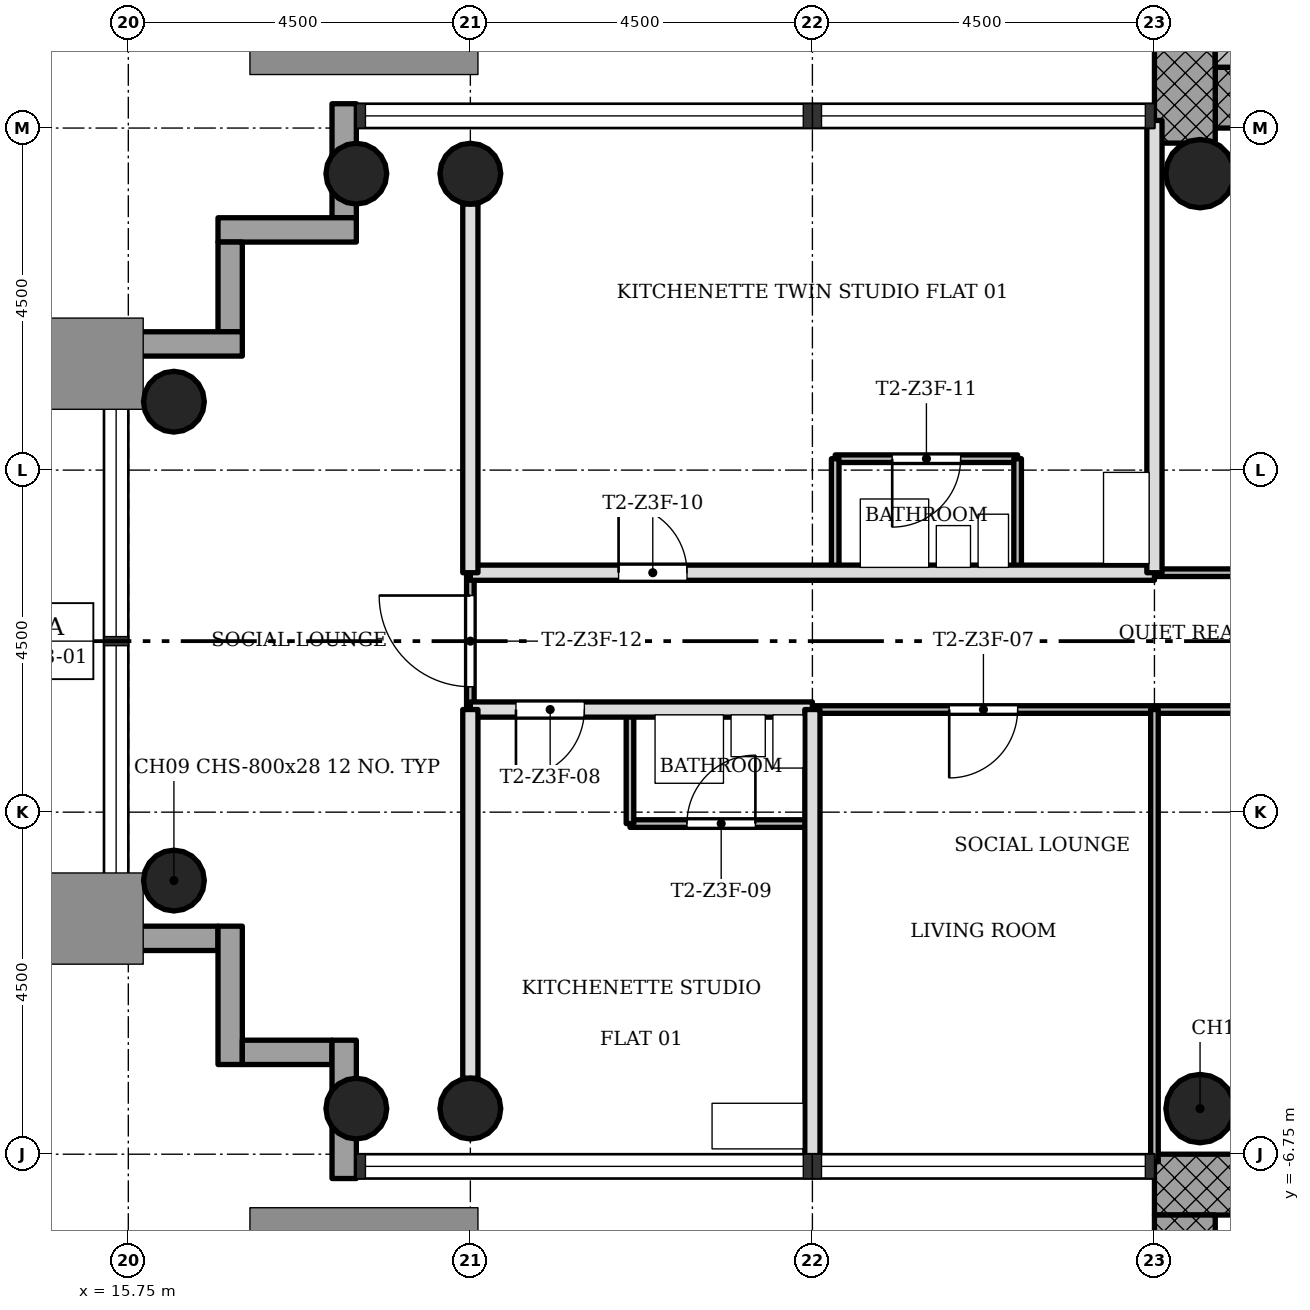
"""IFC4 building model, lengths in metres.
Left out: names, types, materials, properties, quantities, classifications, styles, units other than length and angle.
Written with IfcOpenShell. Run it as: python <this file> out.ifc"""

import sys

from ifc_helpers import new_model, si_unit, direction, frame, frame_2d, origin, origin_2d, place, context, subcontext, project, spatial, rectangle, hollow_circle, extrude, element, fill, save


model = new_model("IFC4")
c1 = context("Model", 3, precision=1e-05, world=origin(), true_north=direction((0.0, 1.0)))
c2 = subcontext(c1, "Body", "Model", "MODEL_VIEW")
j1 = project(units=[si_unit("LENGTHUNIT", "METRE"), si_unit("PLANEANGLEUNIT", "RADIAN")], contexts=[c1])
p1 = place(None, origin())
s1 = spatial("IfcSite", under=j1, at=p1, CompositionType="ELEMENT")
p2 = place(p1, origin())
s2 = spatial("IfcBuilding", under=s1, at=p2, CompositionType="ELEMENT")
p3 = place(p2, frame((0.0, 0.0, 164.3)))
s3 = spatial("IfcBuildingStorey", under=s2, at=p3, CompositionType="ELEMENT", Elevation=164.3)
p4 = place(p3, frame((30.05, 7.15, 0.0), z_axis=(0.0, 0.0, 1.0), x_axis=(1.0, 0.0, 0.0)))
e1 = element("IfcWall", 1, at=p4, inside=s3, PredefinedType="SHEAR", context=c2, shape_type="SweptSolid", body=[
    extrude(rectangle(XDim=12.7, YDim=0.8, at=frame_2d((6.35, 0.0))), origin(), (0.0, 0.0, 1.0), 3.4),
])
p5 = place(p4, frame((5.05, 0.0, 0.0)))
e2 = element("IfcOpeningElement", 2, at=p5, cuts=e1, PredefinedType="OPENING", context=c2, shape_type="SweptSolid", body=[
    extrude(rectangle(XDim=1.8, YDim=2.1, at=frame_2d((0.9, 1.05))), frame((0.0, 0.41, 0.0), z_axis=(0.0, -1.0, 0.0), x_axis=(1.0, 0.0, 0.0)), (0.0, 0.0, 1.0), 0.82),
])
p6 = place(p3, frame((29.65, 15.348, 0.0), z_axis=(0.0, 0.0, 1.0), x_axis=(0.0, -1.0, 0.0)))
e3 = element("IfcWall", 3, at=p6, inside=s3, PredefinedType="SHEAR", context=c2, shape_type="SweptSolid", body=[
    extrude(rectangle(XDim=8.796, YDim=0.8, at=frame_2d((4.398, 0.0))), origin(), (0.0, 0.0, 1.0), 3.4),
])
p7 = place(p3, frame((41.95, -7.15, 0.0), z_axis=(0.0, 0.0, 1.0), x_axis=(-1.0, 0.0, 0.0)))
e4 = element("IfcWall", 4, at=p7, inside=s3, PredefinedType="SHEAR", context=c2, shape_type="SweptSolid", body=[
    extrude(rectangle(XDim=12.7, YDim=0.8, at=frame_2d((6.35, 0.0))), origin(), (0.0, 0.0, 1.0), 3.4),
])
p8 = place(p7, frame((5.05, 0.0, 0.0)))
e5 = element("IfcOpeningElement", 5, at=p8, cuts=e4, PredefinedType="OPENING", context=c2, shape_type="SweptSolid", body=[
    extrude(rectangle(XDim=1.8, YDim=2.1, at=frame_2d((0.9, 1.05))), frame((0.0, 0.41, 0.0), z_axis=(0.0, -1.0, 0.0), x_axis=(1.0, 0.0, 0.0)), (0.0, 0.0, 1.0), 0.82),
])
p9 = place(p3, frame((29.65, -7.55, 0.0), z_axis=(0.0, 0.0, 1.0), x_axis=(0.0, -1.0, 0.0)))
e6 = element("IfcWall", 6, at=p9, inside=s3, PredefinedType="SHEAR", context=c2, shape_type="SweptSolid", body=[
    extrude(rectangle(XDim=8.2, YDim=0.8, at=frame_2d((4.1, 0.0))), origin(), (0.0, 0.0, 1.0), 3.4),
])
for number, where, z_axis, x_axis in (
    (7, (20.25, 6.15, 0.0), (0.0, 0.0, 1.0), (1.0, 0.0, 0.0)),
    (8, (20.25, -6.15, 0.0), (0.0, 0.0, 1.0), (1.0, 0.0, 0.0)),
    (9, (18.75, 6.15, 0.0), (0.0, 0.0, 1.0), (1.0, 0.0, 0.0)),
    (10, (18.75, -6.15, 0.0), (0.0, 0.0, 1.0), (1.0, 0.0, 0.0)),
    (11, (16.35, 3.15, 0.0), (0.0, 0.0, 1.0), (1.0, 0.0, 0.0)),
    (12, (16.35, -3.15, 0.0), (0.0, 0.0, 1.0), (1.0, 0.0, 0.0)),
):
    element("IfcColumn", number, at=place(p3, frame(where, z_axis=z_axis, x_axis=x_axis)), inside=s3, PredefinedType="COLUMN", context=c2, shape_type="SweptSolid", body=[
        extrude(hollow_circle(Radius=0.4, WallThickness=0.028, at=origin_2d()), origin(), (0.0, 0.0, 1.0), 3.4),
    ])
for number, where, z_axis, x_axis in (
    (13, (29.85, 6.15, 0.0), (0.0, 0.0, 1.0), (1.0, 0.0, 0.0)),
    (14, (29.85, -6.15, 0.0), (0.0, 0.0, 1.0), (1.0, 0.0, 0.0)),
):
    element("IfcColumn", number, at=place(p3, frame(where, z_axis=z_axis, x_axis=x_axis)), inside=s3, PredefinedType="COLUMN", context=c2, shape_type="SweptSolid", body=[
        extrude(hollow_circle(Radius=0.45, WallThickness=0.032, at=origin_2d()), origin(), (0.0, 0.0, 1.0), 3.4),
    ])
p10 = place(p3, frame((18.59, 7.07, -0.3), z_axis=(0.0, 0.0, 1.0), x_axis=(0.0, -1.0, 0.0)))
e15 = element("IfcWall", 15, at=p10, inside=s3, PredefinedType="STANDARD", context=c2, shape_type="SweptSolid", body=[
    extrude(rectangle(XDim=1.5, YDim=0.32, at=frame_2d((0.75, 0.0))), origin(), (0.0, 0.0, 1.0), 3.4),
])
p11 = place(p3, frame((18.75, 5.41, -0.3), z_axis=(0.0, 0.0, 1.0), x_axis=(-1.0, 0.0, 0.0)))
e16 = element("IfcWall", 16, at=p11, inside=s3, PredefinedType="STANDARD", context=c2, shape_type="SweptSolid", body=[
    extrude(rectangle(XDim=1.82, YDim=0.32, at=frame_2d((0.91, 0.0))), origin(), (0.0, 0.0, 1.0), 3.4),
])
p12 = place(p3, frame((17.09, 5.25, -0.3), z_axis=(0.0, 0.0, 1.0), x_axis=(0.0, -1.0, 0.0)))
e17 = element("IfcWall", 17, at=p12, inside=s3, PredefinedType="STANDARD", context=c2, shape_type="SweptSolid", body=[
    extrude(rectangle(XDim=1.18, YDim=0.32, at=frame_2d((0.59, 0.0))), origin(), (0.0, 0.0, 1.0), 3.4),
])
p13 = place(p3, frame((17.25, 3.91, -0.3), z_axis=(0.0, 0.0, 1.0), x_axis=(-1.0, 0.0, 0.0)))
e18 = element("IfcWall", 18, at=p13, inside=s3, PredefinedType="STANDARD", context=c2, shape_type="SweptSolid", body=[
    extrude(rectangle(XDim=1.82, YDim=0.32, at=frame_2d((0.91, 0.0))), origin(), (0.0, 0.0, 1.0), 3.4),
])
p14 = place(p3, frame((15.43, -3.91, -0.3), z_axis=(0.0, 0.0, 1.0), x_axis=(1.0, 0.0, 0.0)))
e19 = element("IfcWall", 19, at=p14, inside=s3, PredefinedType="STANDARD", context=c2, shape_type="SweptSolid", body=[
    extrude(rectangle(XDim=1.5, YDim=0.32, at=frame_2d((0.75, 0.0))), origin(), (0.0, 0.0, 1.0), 3.4),
])
p15 = place(p3, frame((17.09, -3.75, -0.3), z_axis=(0.0, 0.0, 1.0), x_axis=(0.0, -1.0, 0.0)))
e20 = element("IfcWall", 20, at=p15, inside=s3, PredefinedType="STANDARD", context=c2, shape_type="SweptSolid", body=[
    extrude(rectangle(XDim=1.82, YDim=0.32, at=frame_2d((0.91, 0.0))), origin(), (0.0, 0.0, 1.0), 3.4),
])
p16 = place(p3, frame((17.25, -5.41, -0.3), z_axis=(0.0, 0.0, 1.0), x_axis=(1.0, 0.0, 0.0)))
e21 = element("IfcWall", 21, at=p16, inside=s3, PredefinedType="STANDARD", context=c2, shape_type="SweptSolid", body=[
    extrude(rectangle(XDim=1.18, YDim=0.32, at=frame_2d((0.59, 0.0))), origin(), (0.0, 0.0, 1.0), 3.4),
])
p17 = place(p3, frame((18.59, -5.25, -0.3), z_axis=(0.0, 0.0, 1.0), x_axis=(0.0, -1.0, 0.0)))
e22 = element("IfcWall", 22, at=p17, inside=s3, PredefinedType="STANDARD", context=c2, shape_type="SweptSolid", body=[
    extrude(rectangle(XDim=1.82, YDim=0.32, at=frame_2d((0.91, 0.0))), origin(), (0.0, 0.0, 1.0), 3.4),
])
p18 = place(p3, frame((24.75, -2.4, 0.0), z_axis=(0.0, 0.0, 1.0), x_axis=(-1.0, 0.0, 0.0)))
e23 = element("IfcWall", 23, at=p18, inside=s3, PredefinedType="PARTITIONING", context=c2, shape_type="SweptSolid", body=[
    extrude(rectangle(XDim=2.4, YDim=0.1, at=frame_2d((1.2, 0.0))), origin(), (0.0, 0.0, 1.0), 3.0),
])
p19 = place(p18, frame((0.75, 0.0, 0.0)))
e24 = element("IfcOpeningElement", 24, at=p19, cuts=e23, PredefinedType="OPENING", context=c2, shape_type="SweptSolid", body=[
    extrude(rectangle(XDim=0.9, YDim=2.1, at=frame_2d((0.45, 1.05))), frame((0.0, 0.06, 0.0), z_axis=(0.0, -1.0, 0.0), x_axis=(1.0, 0.0, 0.0)), (0.0, 0.0, 1.0), 0.12),
])
p20 = place(p3, frame((31.5, -0.9, 0.0), z_axis=(0.0, 0.0, 1.0), x_axis=(-1.0, 0.0, 0.0)))
e25 = element("IfcWall", 25, at=p20, inside=s3, PredefinedType="PARTITIONING", context=c2, shape_type="SweptSolid", body=[
    extrude(rectangle(XDim=6.75, YDim=0.1, at=frame_2d((3.375, 0.0))), origin(), (0.0, 0.0, 1.0), 3.0),
])
p21 = place(p20, frame((4.05, 0.0, 0.0)))
e26 = element("IfcOpeningElement", 26, at=p21, cuts=e25, PredefinedType="OPENING", context=c2, shape_type="SweptSolid", body=[
    extrude(rectangle(XDim=0.9, YDim=2.1, at=frame_2d((0.45, 1.05))), frame((0.0, 0.06, 0.0), z_axis=(0.0, -1.0, 0.0), x_axis=(1.0, 0.0, 0.0)), (0.0, 0.0, 1.0), 0.12),
])
p22 = place(p3, frame((24.75, -0.9, 0.0), z_axis=(0.0, 0.0, 1.0), x_axis=(-1.0, 0.0, 0.0)))
e27 = element("IfcWall", 27, at=p22, inside=s3, PredefinedType="SOLIDWALL", context=c2, shape_type="SweptSolid", body=[
    extrude(rectangle(XDim=4.5, YDim=0.2, at=frame_2d((2.25, 0.0))), origin(), (0.0, 0.0, 1.0), 3.0),
])
p23 = place(p22, frame((3.0, 0.0, 0.0)))
e28 = element("IfcOpeningElement", 28, at=p23, cuts=e27, PredefinedType="OPENING", context=c2, shape_type="SweptSolid", body=[
    extrude(rectangle(XDim=0.9, YDim=2.1, at=frame_2d((0.45, 1.05))), frame((0.0, 0.11, 0.0), z_axis=(0.0, -1.0, 0.0), x_axis=(1.0, 0.0, 0.0)), (0.0, 0.0, 1.0), 0.22),
])
p24 = place(p3, frame((31.5, 0.9, 0.0), z_axis=(0.0, 0.0, 1.0), x_axis=(-1.0, 0.0, 0.0)))
e29 = element("IfcWall", 29, at=p24, inside=s3, PredefinedType="PARTITIONING", context=c2, shape_type="SweptSolid", body=[
    extrude(rectangle(XDim=2.25, YDim=0.1, at=frame_2d((1.125, 0.0))), origin(), (0.0, 0.0, 1.0), 3.0),
])
p25 = place(p3, frame((29.25, 0.9, 0.0), z_axis=(0.0, 0.0, 1.0), x_axis=(-1.0, 0.0, 0.0)))
e30 = element("IfcWall", 30, at=p25, inside=s3, PredefinedType="SOLIDWALL", context=c2, shape_type="SweptSolid", body=[
    extrude(rectangle(XDim=9.0, YDim=0.2, at=frame_2d((4.5, 0.0))), origin(), (0.0, 0.0, 1.0), 3.0),
])
p26 = place(p25, frame((6.15, 0.0, 0.0)))
e31 = element("IfcOpeningElement", 31, at=p26, cuts=e30, PredefinedType="OPENING", context=c2, shape_type="SweptSolid", body=[
    extrude(rectangle(XDim=0.9, YDim=2.1, at=frame_2d((0.45, 1.05))), frame((0.0, 0.11, 0.0), z_axis=(0.0, -1.0, 0.0), x_axis=(1.0, 0.0, 0.0)), (0.0, 0.0, 1.0), 0.22),
])
p27 = place(p3, frame((27.45, 2.4, 0.0), z_axis=(0.0, 0.0, 1.0), x_axis=(-1.0, 0.0, 0.0)))
e32 = element("IfcWall", 32, at=p27, inside=s3, PredefinedType="PARTITIONING", context=c2, shape_type="SweptSolid", body=[
    extrude(rectangle(XDim=2.4, YDim=0.1, at=frame_2d((1.2, 0.0))), origin(), (0.0, 0.0, 1.0), 3.0),
])
p28 = place(p27, frame((0.75, 0.0, 0.0)))
e33 = element("IfcOpeningElement", 33, at=p28, cuts=e32, PredefinedType="OPENING", context=c2, shape_type="SweptSolid", body=[
    extrude(rectangle(XDim=0.9, YDim=2.1, at=frame_2d((0.45, 1.05))), frame((0.0, 0.06, 0.0), z_axis=(0.0, -1.0, 0.0), x_axis=(1.0, 0.0, 0.0)), (0.0, 0.0, 1.0), 0.12),
])
p29 = place(p3, frame((29.25, -6.85, 0.0), z_axis=(0.0, 0.0, 1.0), x_axis=(0.0, 1.0, 0.0)))
e34 = element("IfcWall", 34, at=p29, inside=s3, PredefinedType="PARTITIONING", context=c2, shape_type="SweptSolid", body=[
    extrude(rectangle(XDim=5.95, YDim=0.1, at=frame_2d((2.975, 0.0))), origin(), (0.0, 0.0, 1.0), 3.0),
])
p30 = place(p3, frame((29.25, 0.9, 0.0), z_axis=(0.0, 0.0, 1.0), x_axis=(0.0, 1.0, 0.0)))
e35 = element("IfcWall", 35, at=p30, inside=s3, PredefinedType="SOLIDWALL", context=c2, shape_type="SweptSolid", body=[
    extrude(rectangle(XDim=5.95, YDim=0.2, at=frame_2d((2.975, 0.0))), origin(), (0.0, 0.0, 1.0), 3.0),
])
for number, where, z_axis, x_axis in (
    (36, (27.45, 0.9, 0.0), (0.0, 0.0, 1.0), (0.0, 1.0, 0.0)),
    (37, (25.05, 0.9, 0.0), (0.0, 0.0, 1.0), (0.0, 1.0, 0.0)),
):
    element("IfcWall", number, at=place(p3, frame(where, z_axis=z_axis, x_axis=x_axis)), inside=s3, PredefinedType="PARTITIONING", context=c2, shape_type="SweptSolid", body=[
        extrude(rectangle(XDim=1.5, YDim=0.1, at=frame_2d((0.75, 0.0))), origin(), (0.0, 0.0, 1.0), 3.0),
    ])
p31 = place(p3, frame((24.75, -6.85, 0.0), z_axis=(0.0, 0.0, 1.0), x_axis=(0.0, 1.0, 0.0)))
e38 = element("IfcWall", 38, at=p31, inside=s3, PredefinedType="SOLIDWALL", context=c2, shape_type="SweptSolid", body=[
    extrude(rectangle(XDim=5.95, YDim=0.2, at=frame_2d((2.975, 0.0))), origin(), (0.0, 0.0, 1.0), 3.0),
])
p32 = place(p3, frame((22.35, -2.4, 0.0), z_axis=(0.0, 0.0, 1.0), x_axis=(0.0, 1.0, 0.0)))
e39 = element("IfcWall", 39, at=p32, inside=s3, PredefinedType="PARTITIONING", context=c2, shape_type="SweptSolid", body=[
    extrude(rectangle(XDim=1.5, YDim=0.1, at=frame_2d((0.75, 0.0))), origin(), (0.0, 0.0, 1.0), 3.0),
])
p33 = place(p3, frame((20.25, -0.9, 0.0), z_axis=(0.0, 0.0, 1.0), x_axis=(0.0, 1.0, 0.0)))
e40 = element("IfcWall", 40, at=p33, inside=s3, PredefinedType="PARTITIONING", context=c2, shape_type="SweptSolid", body=[
    extrude(rectangle(XDim=1.8, YDim=0.1, at=frame_2d((0.9, 0.0))), origin(), (0.0, 0.0, 1.0), 3.0),
])
p34 = place(p33, frame((0.3, 0.0, 0.0)))
e41 = element("IfcOpeningElement", 41, at=p34, cuts=e40, PredefinedType="OPENING", context=c2, shape_type="SweptSolid", body=[
    extrude(rectangle(XDim=1.2, YDim=2.1, at=frame_2d((0.6, 1.05))), frame((0.0, 0.06, 0.0), z_axis=(0.0, -1.0, 0.0), x_axis=(1.0, 0.0, 0.0)), (0.0, 0.0, 1.0), 0.12),
])
for number, where, z_axis, x_axis in (
    (42, (20.25, -5.75, 0.0), (0.0, 0.0, 1.0), (0.0, 1.0, 0.0)),
    (43, (20.25, 0.9, 0.0), (0.0, 0.0, 1.0), (0.0, 1.0, 0.0)),
):
    element("IfcWall", number, at=place(p3, frame(where, z_axis=z_axis, x_axis=x_axis)), inside=s3, PredefinedType="SOLIDWALL", context=c2, shape_type="SweptSolid", body=[
        extrude(rectangle(XDim=4.85, YDim=0.2, at=frame_2d((2.425, 0.0))), origin(), (0.0, 0.0, 1.0), 3.0),
    ])
p35 = place(p3, frame((34.15, 7.75, 0.0), z_axis=(0.0, 0.0, 1.0), x_axis=(-1.0, 0.0, 0.0)))
e44 = element("IfcWall", 44, at=p35, inside=s3, PredefinedType="SHEAR", context=c2, shape_type="SweptSolid", body=[
    extrude(rectangle(XDim=4.1, YDim=0.4, at=frame_2d((2.05, 0.0))), origin(), (0.0, 0.0, 1.0), 3.4),
])
p36 = place(p21, origin())
e45 = element("IfcDoor", 45, at=p36, inside=s3, OperationType="SINGLE_SWING_LEFT", PredefinedType="DOOR", context=c2, shape_type="SweptSolid", body=[
    extrude(rectangle(XDim=0.9, YDim=2.1, at=frame_2d((0.45, 1.05))), frame((0.0, 0.025, 0.0), z_axis=(0.0, -1.0, 0.0), x_axis=(1.0, 0.0, 0.0)), (0.0, 0.0, 1.0), 0.05),
])
fill(e26, e45)
p37 = place(p23, origin())
e46 = element("IfcDoor", 46, at=p37, inside=s3, OperationType="SINGLE_SWING_LEFT", PredefinedType="DOOR", context=c2, shape_type="SweptSolid", body=[
    extrude(rectangle(XDim=0.9, YDim=2.1, at=frame_2d((0.45, 1.05))), frame((0.0, 0.025, 0.0), z_axis=(0.0, -1.0, 0.0), x_axis=(1.0, 0.0, 0.0)), (0.0, 0.0, 1.0), 0.05),
])
fill(e28, e46)
p38 = place(p19, origin())
e47 = element("IfcDoor", 47, at=p38, inside=s3, OperationType="SINGLE_SWING_LEFT", PredefinedType="DOOR", context=c2, shape_type="SweptSolid", body=[
    extrude(rectangle(XDim=0.9, YDim=2.1, at=frame_2d((0.45, 1.05))), frame((0.0, 0.025, 0.0), z_axis=(0.0, -1.0, 0.0), x_axis=(1.0, 0.0, 0.0)), (0.0, 0.0, 1.0), 0.05),
])
fill(e24, e47)
p39 = place(p26, origin())
e48 = element("IfcDoor", 48, at=p39, inside=s3, OperationType="SINGLE_SWING_RIGHT", PredefinedType="DOOR", context=c2, shape_type="SweptSolid", body=[
    extrude(rectangle(XDim=0.9, YDim=2.1, at=frame_2d((0.45, 1.05))), frame((0.0, 0.025, 0.0), z_axis=(0.0, -1.0, 0.0), x_axis=(1.0, 0.0, 0.0)), (0.0, 0.0, 1.0), 0.05),
])
fill(e31, e48)
p40 = place(p28, origin())
e49 = element("IfcDoor", 49, at=p40, inside=s3, OperationType="SINGLE_SWING_LEFT", PredefinedType="DOOR", context=c2, shape_type="SweptSolid", body=[
    extrude(rectangle(XDim=0.9, YDim=2.1, at=frame_2d((0.45, 1.05))), frame((0.0, 0.025, 0.0), z_axis=(0.0, -1.0, 0.0), x_axis=(1.0, 0.0, 0.0)), (0.0, 0.0, 1.0), 0.05),
])
fill(e33, e49)
p41 = place(p34, origin())
e50 = element("IfcDoor", 50, at=p41, inside=s3, OperationType="SINGLE_SWING_LEFT", PredefinedType="DOOR", context=c2, shape_type="SweptSolid", body=[
    extrude(rectangle(XDim=1.2, YDim=2.1, at=frame_2d((0.6, 1.05))), frame((0.0, 0.025, 0.0), z_axis=(0.0, -1.0, 0.0), x_axis=(1.0, 0.0, 0.0)), (0.0, 0.0, 1.0), 0.05),
])
fill(e41, e50)
save(model, sys.argv[1])
